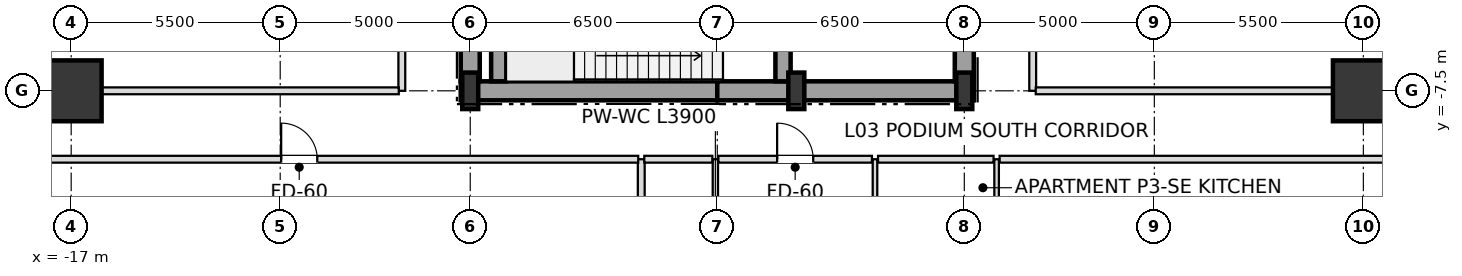
"""IFC4 building model, lengths in metres.
Left out: names, types, materials, properties, quantities, classifications, styles, units other than length and angle.
Written with IfcOpenShell. Run it as: python <this file> out.ifc"""

import sys

from ifc_helpers import new_model, si_unit, direction, frame, frame_2d, origin, origin_2d, place, context, subcontext, project, spatial, rectangle, i_section, extrude, element, fill, save


model = new_model("IFC4")
c1 = context("Model", 3, precision=1e-05, world=origin(), true_north=direction((0.0, 1.0)))
c2 = subcontext(c1, "Body", "Model", "MODEL_VIEW")
j1 = project(units=[si_unit("LENGTHUNIT", "METRE"), si_unit("PLANEANGLEUNIT", "RADIAN")], contexts=[c1])
p1 = place(None, origin())
s1 = spatial("IfcSite", under=j1, at=p1, CompositionType="ELEMENT")
p2 = place(p1, origin())
s2 = spatial("IfcBuilding", under=s1, at=p2, CompositionType="ELEMENT")
p3 = place(p2, frame((0.0, 0.0, 16.8)))
s3 = spatial("IfcBuildingStorey", under=s2, at=p3, CompositionType="ELEMENT", Elevation=16.8)
for number, where, z_axis, x_axis in (
    (1, (-6.5, -7.5, 0.0), (0.0, 0.0, 1.0), (1.0, 0.0, 0.0)),
    (2, (2.08, -7.5, 0.0), (0.0, 0.0, 1.0), (1.0, 0.0, 0.0)),
    (3, (6.5, -7.5, 0.0), (0.0, 0.0, 1.0), (1.0, 0.0, 0.0)),
):
    element("IfcColumn", number, at=place(p3, frame(where, z_axis=z_axis, x_axis=x_axis)), inside=s3, PredefinedType="COLUMN", context=c2, shape_type="SweptSolid", body=[
        extrude(i_section(OverallWidth=0.42, OverallDepth=0.96, WebThickness=0.022, FlangeThickness=0.034, at=origin_2d()), origin(), (0.0, 0.0, 1.0), 5.4),
    ])
for number, where, z_axis, x_axis in (
    (4, (17.0, -7.5, 0.0), (0.0, 0.0, 1.0), (1.0, 0.0, 0.0)),
    (5, (-17.0, -7.5, 0.0), (0.0, 0.0, 1.0), (1.0, 0.0, 0.0)),
):
    element("IfcColumn", number, at=place(p3, frame(where, z_axis=z_axis, x_axis=x_axis)), inside=s3, PredefinedType="USERDEFINED", context=c2, shape_type="SweptSolid", body=[
        extrude(rectangle(XDim=1.6, YDim=1.6, at=origin_2d()), origin(), (0.0, 0.0, 1.0), 5.4),
    ])
for number, where, z_axis, x_axis in (
    (6, (-6.75, -7.5, 0.0), (0.0, 0.0, 1.0), (1.0, 0.0, 0.0)),
    (7, (0.0, -7.5, 0.0), (0.0, 0.0, 1.0), (1.0, 0.0, 0.0)),
):
    element("IfcWall", number, at=place(p3, frame(where, z_axis=z_axis, x_axis=x_axis)), inside=s3, PredefinedType="SHEAR", context=c2, shape_type="SweptSolid", body=[
        extrude(rectangle(XDim=6.75, YDim=0.5, at=frame_2d((3.375, 0.0))), origin(), (0.0, 0.0, 1.0), 5.12),
    ])
p4 = place(p3, frame((-6.5, -7.25, 0.0), z_axis=(0.0, 0.0, 1.0), x_axis=(0.0, 1.0, 0.0)))
e8 = element("IfcWall", 8, at=p4, inside=s3, PredefinedType="SHEAR", context=c2, shape_type="SweptSolid", body=[
    extrude(rectangle(XDim=3.55, YDim=0.5, at=frame_2d((1.775, 0.0))), origin(), (0.0, 0.0, 1.0), 5.12),
])
p5 = place(p3, frame((6.5, -7.25, 0.0), z_axis=(0.0, 0.0, 1.0), x_axis=(0.0, 1.0, 0.0)))
e9 = element("IfcWall", 9, at=p5, inside=s3, PredefinedType="SHEAR", context=c2, shape_type="SweptSolid", body=[
    extrude(rectangle(XDim=5.75, YDim=0.5, at=frame_2d((2.875, 0.0))), origin(), (0.0, 0.0, 1.0), 5.12),
])
p6 = place(p5, frame((0.85, 0.0, 0.0)))
e10 = element("IfcOpeningElement", 10, at=p6, cuts=e9, PredefinedType="OPENING", context=c2, shape_type="SweptSolid", body=[
    extrude(rectangle(XDim=1.05, YDim=2.15, at=frame_2d((0.525, 1.075))), frame((0.0, 0.26, 0.0), z_axis=(0.0, -1.0, 0.0), x_axis=(1.0, 0.0, 0.0)), (0.0, 0.0, 1.0), 0.52),
])
p7 = place(p3, frame((-5.75, -7.25, 0.0), z_axis=(0.0, 0.0, 1.0), x_axis=(0.0, 1.0, 0.0)))
e11 = element("IfcWall", 11, at=p7, inside=s3, PredefinedType="SHEAR", context=c2, shape_type="SweptSolid", body=[
    extrude(rectangle(XDim=2.9, YDim=0.4, at=frame_2d((1.45, 0.0))), origin(), (0.0, 0.0, 1.0), 5.12),
])
p8 = place(p3, frame((1.73, -7.25, 0.0), z_axis=(0.0, 0.0, 1.0), x_axis=(0.0, 1.0, 0.0)))
e12 = element("IfcWall", 12, at=p8, inside=s3, PredefinedType="SHEAR", context=c2, shape_type="SweptSolid", body=[
    extrude(rectangle(XDim=3.3, YDim=0.4, at=frame_2d((1.65, 0.0))), origin(), (0.0, 0.0, 1.0), 5.12),
])
p9 = place(p8, frame((0.9, 0.0, 0.0)))
e13 = element("IfcOpeningElement", 13, at=p9, cuts=e12, PredefinedType="OPENING", context=c2, shape_type="SweptSolid", body=[
    extrude(rectangle(XDim=1.05, YDim=2.15, at=frame_2d((0.525, 1.075))), frame((0.0, 0.21, 0.0), z_axis=(0.0, -1.0, 0.0), x_axis=(1.0, 0.0, 0.0)), (0.0, 0.0, 1.0), 0.42),
])
p10 = place(p3, frame((-8.3, -7.5, 0.0), z_axis=(0.0, 0.0, 1.0), x_axis=(0.0, 1.0, 0.0)))
e14 = element("IfcWall", 14, at=p10, inside=s3, PredefinedType="PARTITIONING", context=c2, shape_type="SweptSolid", body=[
    extrude(rectangle(XDim=15.0, YDim=0.18, at=frame_2d((7.5, 0.0))), origin(), (0.0, 0.0, 1.0), 5.12),
])
p11 = place(p10, frame((7.025, 0.0, 0.0)))
e15 = element("IfcOpeningElement", 15, at=p11, cuts=e14, PredefinedType="OPENING", context=c2, shape_type="SweptSolid", body=[
    extrude(rectangle(XDim=0.95, YDim=2.15, at=frame_2d((0.475, 1.075))), frame((0.0, 0.1, 0.0), z_axis=(0.0, -1.0, 0.0), x_axis=(1.0, 0.0, 0.0)), (0.0, 0.0, 1.0), 0.2),
])
p12 = place(p3, frame((-2.0, -19.255, 0.0), z_axis=(0.0, 0.0, 1.0), x_axis=(0.0, 1.0, 0.0)))
e16 = element("IfcWall", 16, at=p12, inside=s3, PredefinedType="PARTITIONING", context=c2, shape_type="SweptSolid", body=[
    extrude(rectangle(XDim=9.955, YDim=0.18, at=frame_2d((4.978, 0.0))), origin(), (0.0, 0.0, 1.0), 4.642),
])
p13 = place(p3, frame((-0.05, -13.2, 0.0), z_axis=(0.0, 0.0, 1.0), x_axis=(0.0, 1.0, 0.0)))
e17 = element("IfcWall", 17, at=p13, inside=s3, PredefinedType="PARTITIONING", context=c2, shape_type="SweptSolid", body=[
    extrude(rectangle(XDim=3.9, YDim=0.14, at=frame_2d((1.95, 0.0))), origin(), (0.0, 0.0, 1.0), 5.12),
])
p14 = place(p13, frame((1.5, 0.0, 0.0)))
e18 = element("IfcOpeningElement", 18, at=p14, cuts=e17, PredefinedType="OPENING", context=c2, shape_type="SweptSolid", body=[
    extrude(rectangle(XDim=0.9, YDim=2.1, at=frame_2d((0.45, 1.05))), frame((0.0, 0.08, 0.0), z_axis=(0.0, -1.0, 0.0), x_axis=(1.0, 0.0, 0.0)), (0.0, 0.0, 1.0), 0.16),
])
p15 = place(p3, frame((4.15, -13.2, 0.0), z_axis=(0.0, 0.0, 1.0), x_axis=(0.0, 1.0, 0.0)))
e19 = element("IfcWall", 19, at=p15, inside=s3, PredefinedType="PARTITIONING", context=c2, shape_type="SweptSolid", body=[
    extrude(rectangle(XDim=3.9, YDim=0.12, at=frame_2d((1.95, 0.0))), origin(), (0.0, 0.0, 1.0), 5.12),
])
p16 = place(p15, frame((1.475, 0.0, 0.0)))
e20 = element("IfcOpeningElement", 20, at=p16, cuts=e19, PredefinedType="OPENING", context=c2, shape_type="SweptSolid", body=[
    extrude(rectangle(XDim=0.95, YDim=2.1, at=frame_2d((0.475, 1.05))), frame((0.0, 0.07, 0.0), z_axis=(0.0, -1.0, 0.0), x_axis=(1.0, 0.0, 0.0)), (0.0, 0.0, 1.0), 0.14),
])
p17 = place(p3, frame((7.35, -19.22, 0.0), z_axis=(0.0, 0.0, 1.0), x_axis=(0.0, 1.0, 0.0)))
e21 = element("IfcWall", 21, at=p17, inside=s3, PredefinedType="PARTITIONING", context=c2, shape_type="SweptSolid", body=[
    extrude(rectangle(XDim=9.92, YDim=0.12, at=frame_2d((4.96, 0.0))), origin(), (0.0, 0.0, 1.0), 4.41),
])
p18 = place(p17, frame((7.495, 0.0, 0.0)))
e22 = element("IfcOpeningElement", 22, at=p18, cuts=e21, PredefinedType="OPENING", context=c2, shape_type="SweptSolid", body=[
    extrude(rectangle(XDim=0.95, YDim=2.1, at=frame_2d((0.475, 1.05))), frame((0.0, 0.07, 0.0), z_axis=(0.0, -1.0, 0.0), x_axis=(1.0, 0.0, 0.0)), (0.0, 0.0, 1.0), 0.14),
])
p19 = place(p17, frame((2.57, 0.0, 0.0)))
e23 = element("IfcOpeningElement", 23, at=p19, cuts=e21, PredefinedType="OPENING", context=c2, shape_type="SweptSolid", body=[
    extrude(rectangle(XDim=0.9, YDim=2.1, at=frame_2d((0.45, 1.05))), frame((0.0, 0.07, 0.0), z_axis=(0.0, -1.0, 0.0), x_axis=(1.0, 0.0, 0.0)), (0.0, 0.0, 1.0), 0.14),
])
p20 = place(p3, frame((8.3, -7.5, 0.0), z_axis=(0.0, 0.0, 1.0), x_axis=(0.0, 1.0, 0.0)))
e24 = element("IfcWall", 24, at=p20, inside=s3, PredefinedType="PARTITIONING", context=c2, shape_type="SweptSolid", body=[
    extrude(rectangle(XDim=15.0, YDim=0.18, at=frame_2d((7.5, 0.0))), origin(), (0.0, 0.0, 1.0), 5.12),
])
p21 = place(p20, frame((5.025, 0.0, 0.0)))
e25 = element("IfcOpeningElement", 25, at=p21, cuts=e24, PredefinedType="OPENING", context=c2, shape_type="SweptSolid", body=[
    extrude(rectangle(XDim=0.95, YDim=2.15, at=frame_2d((0.475, 1.075))), frame((0.0, 0.1, 0.0), z_axis=(0.0, -1.0, 0.0), x_axis=(1.0, 0.0, 0.0)), (0.0, 0.0, 1.0), 0.2),
])
p22 = place(p20, frame((12.225, 0.0, 0.0)))
e26 = element("IfcOpeningElement", 26, at=p22, cuts=e24, PredefinedType="OPENING", context=c2, shape_type="SweptSolid", body=[
    extrude(rectangle(XDim=0.95, YDim=2.15, at=frame_2d((0.475, 1.075))), frame((0.0, 0.1, 0.0), z_axis=(0.0, -1.0, 0.0), x_axis=(1.0, 0.0, 0.0)), (0.0, 0.0, 1.0), 0.2),
])
p23 = place(p3, frame((-22.695, -9.3, 0.0), z_axis=(0.0, 0.0, 1.0), x_axis=(1.0, 0.0, 0.0)))
e27 = element("IfcWall", 27, at=p23, inside=s3, PredefinedType="PARTITIONING", context=c2, shape_type="SweptSolid", body=[
    extrude(rectangle(XDim=20.615, YDim=0.18, at=frame_2d((10.308, 0.0))), origin(), (0.0, 0.0, 1.0), 4.41),
])
p24 = place(p23, frame((11.22, 0.0, 0.0)))
e28 = element("IfcOpeningElement", 28, at=p24, cuts=e27, PredefinedType="OPENING", context=c2, shape_type="SweptSolid", body=[
    extrude(rectangle(XDim=0.95, YDim=2.15, at=frame_2d((0.475, 1.075))), frame((0.0, 0.1, 0.0), z_axis=(0.0, -1.0, 0.0), x_axis=(1.0, 0.0, 0.0)), (0.0, 0.0, 1.0), 0.2),
])
p25 = place(p3, frame((-1.92, -9.3, 0.0), z_axis=(0.0, 0.0, 1.0), x_axis=(1.0, 0.0, 0.0)))
e29 = element("IfcWall", 29, at=p25, inside=s3, PredefinedType="PARTITIONING", context=c2, shape_type="SweptSolid", body=[
    extrude(rectangle(XDim=1.79, YDim=0.18, at=frame_2d((0.895, 0.0))), origin(), (0.0, 0.0, 1.0), 5.12),
])
p26 = place(p3, frame((0.03, -9.3, 0.0), z_axis=(0.0, 0.0, 1.0), x_axis=(1.0, 0.0, 0.0)))
e30 = element("IfcWall", 30, at=p26, inside=s3, PredefinedType="PARTITIONING", context=c2, shape_type="SweptSolid", body=[
    extrude(rectangle(XDim=4.04, YDim=0.18, at=frame_2d((2.02, 0.0))), origin(), (0.0, 0.0, 1.0), 5.12),
])
p27 = place(p26, frame((1.545, 0.0, 0.0)))
e31 = element("IfcOpeningElement", 31, at=p27, cuts=e30, PredefinedType="OPENING", context=c2, shape_type="SweptSolid", body=[
    extrude(rectangle(XDim=0.95, YDim=2.15, at=frame_2d((0.475, 1.075))), frame((0.0, 0.1, 0.0), z_axis=(0.0, -1.0, 0.0), x_axis=(1.0, 0.0, 0.0)), (0.0, 0.0, 1.0), 0.2),
])
p28 = place(p3, frame((4.23, -9.3, 0.0), z_axis=(0.0, 0.0, 1.0), x_axis=(1.0, 0.0, 0.0)))
e32 = element("IfcWall", 32, at=p28, inside=s3, PredefinedType="PARTITIONING", context=c2, shape_type="SweptSolid", body=[
    extrude(rectangle(XDim=3.04, YDim=0.18, at=frame_2d((1.52, 0.0))), origin(), (0.0, 0.0, 1.0), 4.41),
])
p29 = place(p3, frame((7.43, -9.3, 0.0), z_axis=(0.0, 0.0, 1.0), x_axis=(1.0, 0.0, 0.0)))
e33 = element("IfcWall", 33, at=p29, inside=s3, PredefinedType="PARTITIONING", context=c2, shape_type="SweptSolid", body=[
    extrude(rectangle(XDim=15.265, YDim=0.18, at=frame_2d((7.633, 0.0))), origin(), (0.0, 0.0, 1.0), 4.41),
])
for number, where, z_axis, x_axis in (
    (34, (-22.695, -7.5, 0.0), (0.0, 0.0, 1.0), (1.0, 0.0, 0.0)),
    (35, (8.38, -7.5, 0.0), (0.0, 0.0, 1.0), (1.0, 0.0, 0.0)),
):
    element("IfcWall", number, at=place(p3, frame(where, z_axis=z_axis, x_axis=x_axis)), inside=s3, PredefinedType="PARTITIONING", context=c2, shape_type="SweptSolid", body=[
        extrude(rectangle(XDim=14.315, YDim=0.18, at=frame_2d((7.158, 0.0))), origin(), (0.0, 0.0, 1.0), 4.41),
    ])
p30 = place(p24, origin())
e36 = element("IfcDoor", 36, at=p30, inside=s3, OperationType="SINGLE_SWING_LEFT", PredefinedType="DOOR", context=c2, shape_type="SweptSolid", body=[
    extrude(rectangle(XDim=0.95, YDim=2.15, at=frame_2d((0.475, 1.075))), frame((0.0, 0.025, 0.0), z_axis=(0.0, -1.0, 0.0), x_axis=(1.0, 0.0, 0.0)), (0.0, 0.0, 1.0), 0.05),
])
fill(e28, e36)
p31 = place(p27, origin())
e37 = element("IfcDoor", 37, at=p31, inside=s3, OperationType="SINGLE_SWING_LEFT", PredefinedType="DOOR", context=c2, shape_type="SweptSolid", body=[
    extrude(rectangle(XDim=0.95, YDim=2.15, at=frame_2d((0.475, 1.075))), frame((0.0, 0.025, 0.0), z_axis=(0.0, -1.0, 0.0), x_axis=(1.0, 0.0, 0.0)), (0.0, 0.0, 1.0), 0.05),
])
fill(e31, e37)
save(model, sys.argv[1])
